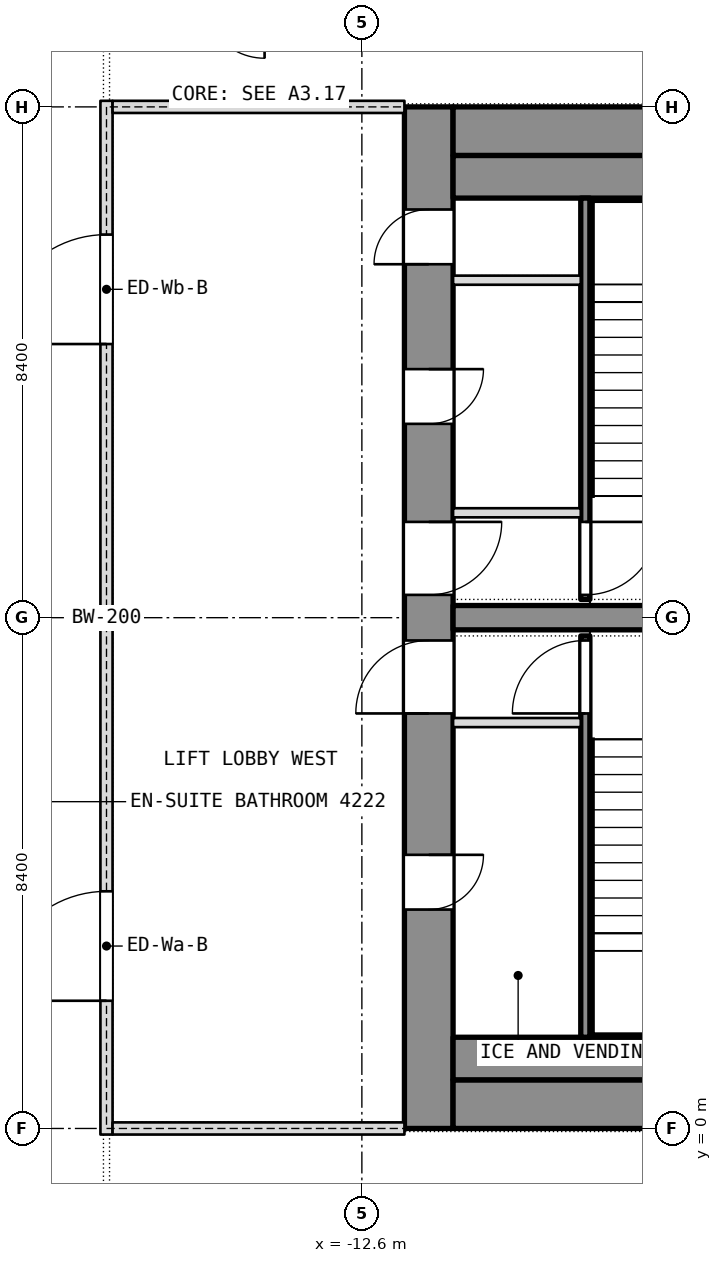
"""IFC4 building model, lengths in metres.
Left out: names, types, materials, properties, quantities, classifications, styles, units other than length and angle.
Written with IfcOpenShell. Run it as: python <this file> out.ifc"""

import sys

from ifc_helpers import new_model, si_unit, direction, frame, frame_2d, origin, place, context, subcontext, project, spatial, rectangle, extrude, element, fill, save


model = new_model("IFC4")
c1 = context("Model", 3, precision=1e-05, world=origin(), true_north=direction((0.0, 1.0)))
c2 = subcontext(c1, "Body", "Model", "MODEL_VIEW")
j1 = project(units=[si_unit("LENGTHUNIT", "METRE"), si_unit("PLANEANGLEUNIT", "RADIAN")], contexts=[c1])
p1 = place(None, origin())
s1 = spatial("IfcSite", under=j1, at=p1, CompositionType="ELEMENT")
p2 = place(p1, origin())
s2 = spatial("IfcBuilding", under=s1, at=p2, CompositionType="ELEMENT")
p3 = place(p2, frame((0.0, 0.0, 187.7)))
s3 = spatial("IfcBuildingStorey", under=s2, at=p3, CompositionType="ELEMENT", Elevation=187.7)
p4 = place(p3, frame((-11.5, 0.0, 0.0), z_axis=(0.0, 0.0, 1.0), x_axis=(0.0, 1.0, 0.0)))
e1 = element("IfcWall", 1, at=p4, inside=s3, PredefinedType="SHEAR", context=c2, shape_type="SweptSolid", body=[
    extrude(rectangle(XDim=16.8, YDim=0.8, at=frame_2d((8.4, 0.0))), origin(), (0.0, 0.0, 1.0), 3.6),
])
p5 = place(p4, frame((3.6, 0.0, 0.0)))
e2 = element("IfcOpeningElement", 2, at=p5, cuts=e1, PredefinedType="OPENING", context=c2, shape_type="SweptSolid", body=[
    extrude(rectangle(XDim=0.9, YDim=2.1, at=frame_2d((0.45, 1.05))), frame((0.0, 0.4, 0.0), z_axis=(0.0, -1.0, 0.0), x_axis=(1.0, 0.0, 0.0)), (0.0, 0.0, 1.0), 0.8),
])
p6 = place(p4, frame((6.825, 0.0, 0.0)))
e3 = element("IfcOpeningElement", 3, at=p6, cuts=e1, PredefinedType="OPENING", context=c2, shape_type="SweptSolid", body=[
    extrude(rectangle(XDim=1.2, YDim=2.1, at=frame_2d((0.6, 1.05))), frame((0.0, 0.4, 0.0), z_axis=(0.0, -1.0, 0.0), x_axis=(1.0, 0.0, 0.0)), (0.0, 0.0, 1.0), 0.8),
])
p7 = place(p4, frame((14.212, 0.0, 0.0)))
e4 = element("IfcOpeningElement", 4, at=p7, cuts=e1, PredefinedType="OPENING", context=c2, shape_type="SweptSolid", body=[
    extrude(rectangle(XDim=0.9, YDim=2.1, at=frame_2d((0.45, 1.05))), frame((0.0, 0.4, 0.0), z_axis=(0.0, -1.0, 0.0), x_axis=(1.0, 0.0, 0.0)), (0.0, 0.0, 1.0), 0.8),
])
p8 = place(p4, frame((11.587, 0.0, 0.0)))
e5 = element("IfcOpeningElement", 5, at=p8, cuts=e1, PredefinedType="OPENING", context=c2, shape_type="SweptSolid", body=[
    extrude(rectangle(XDim=0.9, YDim=2.1, at=frame_2d((0.45, 1.05))), frame((0.0, 0.4, 0.0), z_axis=(0.0, -1.0, 0.0), x_axis=(1.0, 0.0, 0.0)), (0.0, 0.0, 1.0), 0.8),
])
p9 = place(p4, frame((8.775, 0.0, 0.0)))
e6 = element("IfcOpeningElement", 6, at=p9, cuts=e1, PredefinedType="OPENING", context=c2, shape_type="SweptSolid", body=[
    extrude(rectangle(XDim=1.2, YDim=2.1, at=frame_2d((0.6, 1.05))), frame((0.0, 0.4, 0.0), z_axis=(0.0, -1.0, 0.0), x_axis=(1.0, 0.0, 0.0)), (0.0, 0.0, 1.0), 0.8),
])
for number, where, z_axis, x_axis in (
    (7, (-11.1, 0.4, 0.0), (0.0, 0.0, 1.0), (1.0, 0.0, 0.0)),
    (8, (-11.1, 16.4, 0.0), (0.0, 0.0, 1.0), (1.0, 0.0, 0.0)),
):
    element("IfcWall", number, at=place(p3, frame(where, z_axis=z_axis, x_axis=x_axis)), inside=s3, PredefinedType="SHEAR", context=c2, shape_type="SweptSolid", body=[
        extrude(rectangle(XDim=22.2, YDim=0.8, at=frame_2d((11.1, 0.0))), origin(), (0.0, 0.0, 1.0), 3.6),
    ])
p10 = place(p3, frame((-11.1, 8.4, 0.0), z_axis=(0.0, 0.0, 1.0), x_axis=(1.0, 0.0, 0.0)))
e9 = element("IfcWall", 9, at=p10, inside=s3, PredefinedType="SHEAR", context=c2, shape_type="SweptSolid", body=[
    extrude(rectangle(XDim=6.7, YDim=0.4, at=frame_2d((3.35, 0.0))), origin(), (0.0, 0.0, 1.0), 3.6),
])
for number, where, z_axis, x_axis in (
    (10, (-11.1, 1.15, 0.0), (0.0, 0.0, 1.0), (1.0, 0.0, 0.0)),
    (11, (-11.1, 15.65, 0.0), (0.0, 0.0, 1.0), (1.0, 0.0, 0.0)),
):
    element("IfcWall", number, at=place(p3, frame(where, z_axis=z_axis, x_axis=x_axis)), inside=s3, PredefinedType="PARTITIONING", context=c2, shape_type="SweptSolid", body=[
        extrude(rectangle(XDim=22.2, YDim=0.7, at=frame_2d((11.1, 0.0))), origin(), (0.0, 0.0, 1.0), 3.34),
    ])
p11 = place(p3, frame((-8.925, 1.5, 0.0), z_axis=(0.0, 0.0, 1.0), x_axis=(0.0, 1.0, 0.0)))
e12 = element("IfcWall", 12, at=p11, inside=s3, PredefinedType="SHEAR", context=c2, shape_type="SweptSolid", body=[
    extrude(rectangle(XDim=6.6, YDim=0.15, at=frame_2d((3.3, 0.0))), origin(), (0.0, 0.0, 1.0), 3.34),
])
p12 = place(p11, frame((5.325, 0.0, 0.0)))
e13 = element("IfcOpeningElement", 13, at=p12, cuts=e12, PredefinedType="OPENING", context=c2, shape_type="SweptSolid", body=[
    extrude(rectangle(XDim=1.2, YDim=2.1, at=frame_2d((0.6, 1.05))), frame((0.0, 0.075, 0.0), z_axis=(0.0, -1.0, 0.0), x_axis=(1.0, 0.0, 0.0)), (0.0, 0.0, 1.0), 0.15),
])
p13 = place(p3, frame((-11.1, 6.675, 0.0), z_axis=(0.0, 0.0, 1.0), x_axis=(1.0, 0.0, 0.0)))
e14 = element("IfcWall", 14, at=p13, inside=s3, PredefinedType="PARTITIONING", context=c2, shape_type="SweptSolid", body=[
    extrude(rectangle(XDim=2.1, YDim=0.15, at=frame_2d((1.05, 0.0))), origin(), (0.0, 0.0, 1.0), 3.34),
])
p14 = place(p3, frame((-8.925, 8.7, 0.0), z_axis=(0.0, 0.0, 1.0), x_axis=(0.0, 1.0, 0.0)))
e15 = element("IfcWall", 15, at=p14, inside=s3, PredefinedType="SHEAR", context=c2, shape_type="SweptSolid", body=[
    extrude(rectangle(XDim=6.6, YDim=0.15, at=frame_2d((3.3, 0.0))), origin(), (0.0, 0.0, 1.0), 3.34),
])
p15 = place(p14, frame((0.075, 0.0, 0.0)))
e16 = element("IfcOpeningElement", 16, at=p15, cuts=e15, PredefinedType="OPENING", context=c2, shape_type="SweptSolid", body=[
    extrude(rectangle(XDim=1.2, YDim=2.1, at=frame_2d((0.6, 1.05))), frame((0.0, 0.075, 0.0), z_axis=(0.0, -1.0, 0.0), x_axis=(1.0, 0.0, 0.0)), (0.0, 0.0, 1.0), 0.15),
])
for number, where, z_axis, x_axis in (
    (17, (-11.1, 10.125, 0.0), (0.0, 0.0, 1.0), (1.0, 0.0, 0.0)),
    (18, (-11.1, 13.95, 0.0), (0.0, 0.0, 1.0), (1.0, 0.0, 0.0)),
):
    element("IfcWall", number, at=place(p3, frame(where, z_axis=z_axis, x_axis=x_axis)), inside=s3, PredefinedType="PARTITIONING", context=c2, shape_type="SweptSolid", body=[
        extrude(rectangle(XDim=2.1, YDim=0.15, at=frame_2d((1.05, 0.0))), origin(), (0.0, 0.0, 1.0), 3.34),
    ])
p16 = place(p3, frame((-16.8, -0.1, 0.0), z_axis=(0.0, 0.0, 1.0), x_axis=(0.0, 1.0, 0.0)))
e19 = element("IfcWall", 19, at=p16, inside=s3, PredefinedType="PARTITIONING", context=c2, shape_type="SweptSolid", body=[
    extrude(rectangle(XDim=17.0, YDim=0.2, at=frame_2d((8.5, 0.0))), origin(), (0.0, 0.0, 1.0), 3.34),
])
p17 = place(p16, frame((2.2, 0.0, 0.0)))
e20 = element("IfcOpeningElement", 20, at=p17, cuts=e19, PredefinedType="OPENING", context=c2, shape_type="SweptSolid", body=[
    extrude(rectangle(XDim=1.8, YDim=2.1, at=frame_2d((0.9, 1.05))), frame((0.0, 0.1, 0.0), z_axis=(0.0, -1.0, 0.0), x_axis=(1.0, 0.0, 0.0)), (0.0, 0.0, 1.0), 0.2),
])
p18 = place(p16, frame((13.0, 0.0, 0.0)))
e21 = element("IfcOpeningElement", 21, at=p18, cuts=e19, PredefinedType="OPENING", context=c2, shape_type="SweptSolid", body=[
    extrude(rectangle(XDim=1.8, YDim=2.1, at=frame_2d((0.9, 1.05))), frame((0.0, 0.1, 0.0), z_axis=(0.0, -1.0, 0.0), x_axis=(1.0, 0.0, 0.0)), (0.0, 0.0, 1.0), 0.2),
])
for number, where, z_axis, x_axis in (
    (22, (-16.7, 0.0, 0.0), (0.0, 0.0, 1.0), (1.0, 0.0, 0.0)),
    (23, (-16.7, 16.8, 0.0), (0.0, 0.0, 1.0), (1.0, 0.0, 0.0)),
):
    element("IfcWall", number, at=place(p3, frame(where, z_axis=z_axis, x_axis=x_axis)), inside=s3, PredefinedType="PARTITIONING", context=c2, shape_type="SweptSolid", body=[
        extrude(rectangle(XDim=4.8, YDim=0.2, at=frame_2d((2.4, 0.0))), origin(), (0.0, 0.0, 1.0), 2.94),
    ])
p19 = place(p5, origin())
e24 = element("IfcDoor", 24, at=p19, inside=s3, OperationType="SINGLE_SWING_LEFT", PredefinedType="DOOR", context=c2, shape_type="SweptSolid", body=[
    extrude(rectangle(XDim=0.9, YDim=2.1, at=frame_2d((0.45, 1.05))), frame((0.0, 0.025, 0.0), z_axis=(0.0, -1.0, 0.0), x_axis=(1.0, 0.0, 0.0)), (0.0, 0.0, 1.0), 0.05),
])
fill(e2, e24)
p20 = place(p6, origin())
e25 = element("IfcDoor", 25, at=p20, inside=s3, OperationType="SINGLE_SWING_LEFT", PredefinedType="DOOR", context=c2, shape_type="SweptSolid", body=[
    extrude(rectangle(XDim=1.2, YDim=2.1, at=frame_2d((0.6, 1.05))), frame((0.0, 0.025, 0.0), z_axis=(0.0, -1.0, 0.0), x_axis=(1.0, 0.0, 0.0)), (0.0, 0.0, 1.0), 0.05),
])
fill(e3, e25)
p21 = place(p12, origin())
e26 = element("IfcDoor", 26, at=p21, inside=s3, OperationType="SINGLE_SWING_LEFT", PredefinedType="DOOR", context=c2, shape_type="SweptSolid", body=[
    extrude(rectangle(XDim=1.2, YDim=2.1, at=frame_2d((0.6, 1.05))), frame((0.0, 0.025, 0.0), z_axis=(0.0, -1.0, 0.0), x_axis=(1.0, 0.0, 0.0)), (0.0, 0.0, 1.0), 0.05),
])
fill(e13, e26)
p22 = place(p7, origin())
e27 = element("IfcDoor", 27, at=p22, inside=s3, OperationType="SINGLE_SWING_LEFT", PredefinedType="DOOR", context=c2, shape_type="SweptSolid", body=[
    extrude(rectangle(XDim=0.9, YDim=2.1, at=frame_2d((0.45, 1.05))), frame((0.0, 0.025, 0.0), z_axis=(0.0, -1.0, 0.0), x_axis=(1.0, 0.0, 0.0)), (0.0, 0.0, 1.0), 0.05),
])
fill(e4, e27)
p23 = place(p8, origin())
e28 = element("IfcDoor", 28, at=p23, inside=s3, OperationType="SINGLE_SWING_LEFT", PredefinedType="DOOR", context=c2, shape_type="SweptSolid", body=[
    extrude(rectangle(XDim=0.9, YDim=2.1, at=frame_2d((0.45, 1.05))), frame((0.0, 0.025, 0.0), z_axis=(0.0, -1.0, 0.0), x_axis=(1.0, 0.0, 0.0)), (0.0, 0.0, 1.0), 0.05),
])
fill(e5, e28)
p24 = place(p9, origin())
e29 = element("IfcDoor", 29, at=p24, inside=s3, OperationType="SINGLE_SWING_LEFT", PredefinedType="DOOR", context=c2, shape_type="SweptSolid", body=[
    extrude(rectangle(XDim=1.2, YDim=2.1, at=frame_2d((0.6, 1.05))), frame((0.0, 0.025, 0.0), z_axis=(0.0, -1.0, 0.0), x_axis=(1.0, 0.0, 0.0)), (0.0, 0.0, 1.0), 0.05),
])
fill(e6, e29)
p25 = place(p15, origin())
e30 = element("IfcDoor", 30, at=p25, inside=s3, OperationType="SINGLE_SWING_LEFT", PredefinedType="DOOR", context=c2, shape_type="SweptSolid", body=[
    extrude(rectangle(XDim=1.2, YDim=2.1, at=frame_2d((0.6, 1.05))), frame((0.0, 0.025, 0.0), z_axis=(0.0, -1.0, 0.0), x_axis=(1.0, 0.0, 0.0)), (0.0, 0.0, 1.0), 0.05),
])
fill(e16, e30)
p26 = place(p17, origin())
e31 = element("IfcDoor", 31, at=p26, inside=s3, OperationType="DOUBLE_DOOR_SINGLE_SWING", PredefinedType="DOOR", context=c2, shape_type="SweptSolid", body=[
    extrude(rectangle(XDim=1.8, YDim=2.1, at=frame_2d((0.9, 1.05))), frame((0.0, 0.025, 0.0), z_axis=(0.0, -1.0, 0.0), x_axis=(1.0, 0.0, 0.0)), (0.0, 0.0, 1.0), 0.05),
])
fill(e20, e31)
p27 = place(p18, origin())
e32 = element("IfcDoor", 32, at=p27, inside=s3, OperationType="DOUBLE_DOOR_SINGLE_SWING", PredefinedType="DOOR", context=c2, shape_type="SweptSolid", body=[
    extrude(rectangle(XDim=1.8, YDim=2.1, at=frame_2d((0.9, 1.05))), frame((0.0, 0.025, 0.0), z_axis=(0.0, -1.0, 0.0), x_axis=(1.0, 0.0, 0.0)), (0.0, 0.0, 1.0), 0.05),
])
fill(e21, e32)
save(model, sys.argv[1])
